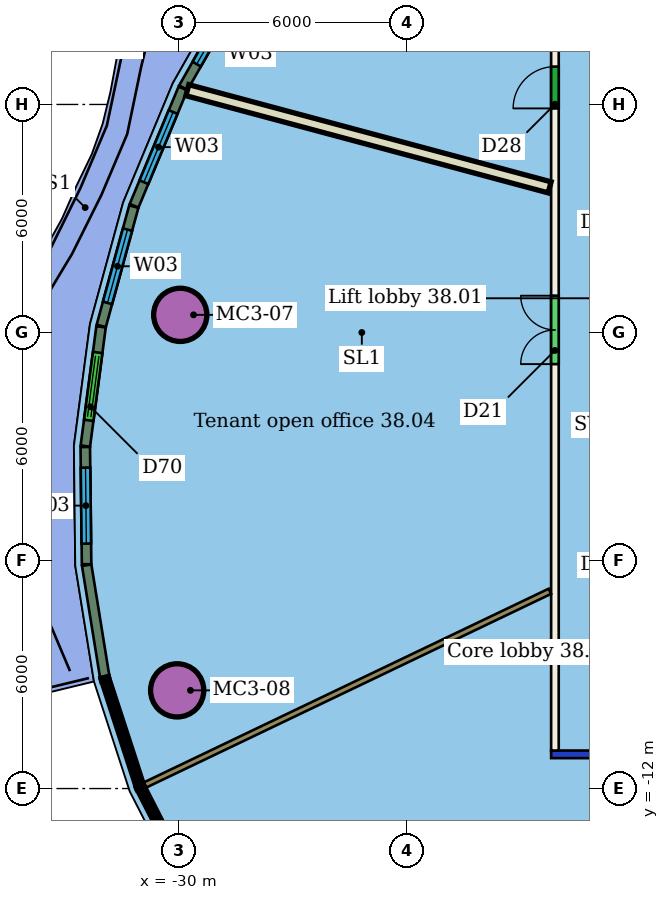
"""IFC4 building model, lengths in metres.
Left out: names, types, materials, properties, quantities, classifications, styles, units other than length and angle.
Written with IfcOpenShell. Run it as: python <this file> out.ifc"""

import sys

from ifc_helpers import new_model, si_unit, direction, frame, frame_2d, origin, origin_2d, place, context, subcontext, project, spatial, rectangle, hollow_circle, extrude, element, fill, save


model = new_model("IFC4")
c1 = context("Model", 3, precision=1e-05, world=origin(), true_north=direction((0.0, 1.0)))
c2 = subcontext(c1, "Body", "Model", "MODEL_VIEW")
j1 = project(units=[si_unit("LENGTHUNIT", "METRE"), si_unit("PLANEANGLEUNIT", "RADIAN")], contexts=[c1])
p1 = place(None, origin())
s1 = spatial("IfcSite", under=j1, at=p1, CompositionType="ELEMENT")
p2 = place(p1, origin())
s2 = spatial("IfcBuilding", under=s1, at=p2, CompositionType="ELEMENT")
p3 = place(p2, frame((0.0, 0.0, 161.4)))
s3 = spatial("IfcBuildingStorey", under=s2, at=p3, CompositionType="ELEMENT", Elevation=161.4)
for number, where, z_axis, x_axis in (
    (1, (-29.959, 0.464, 0.0), (0.0, 0.0, 1.0), (1.0, 0.0, 0.0)),
    (2, (-30.041, -9.417, 0.0), (0.0, 0.0, 1.0), (1.0, 0.0, 0.0)),
):
    element("IfcColumn", number, at=place(p3, frame(where, z_axis=z_axis, x_axis=x_axis)), inside=s3, PredefinedType="COLUMN", context=c2, shape_type="SweptSolid", body=[
        extrude(hollow_circle(Radius=0.7, WallThickness=0.05, at=origin_2d()), origin(), (0.0, 0.0, 1.0), 3.45),
    ])
p4 = place(p3, frame((8.2, -11.1, 0.0), z_axis=(0.0, 0.0, 1.0), x_axis=(-1.0, 0.0, 0.0)))
e3 = element("IfcWall", 3, at=p4, inside=s3, PredefinedType="PARTITIONING", context=c2, shape_type="SweptSolid", body=[
    extrude(rectangle(XDim=28.4, YDim=0.2, at=frame_2d((14.2, 0.0))), origin(), (0.0, 0.0, 1.0), 3.05),
])
p5 = place(p4, frame((24.868, 0.0, 0.0)))
e4 = element("IfcOpeningElement", 4, at=p5, cuts=e3, PredefinedType="OPENING", context=c2, shape_type="SweptSolid", body=[
    extrude(rectangle(XDim=1.0, YDim=2.1, at=frame_2d((0.5, 1.05))), frame((0.0, 0.11, 0.0), z_axis=(0.0, -1.0, 0.0), x_axis=(1.0, 0.0, 0.0)), (0.0, 0.0, 1.0), 0.22),
])
p6 = place(p4, frame((18.971, 0.0, 0.0)))
e5 = element("IfcOpeningElement", 5, at=p6, cuts=e3, PredefinedType="OPENING", context=c2, shape_type="SweptSolid", body=[
    extrude(rectangle(XDim=1.8, YDim=2.4, at=frame_2d((0.9, 1.2))), frame((0.0, 0.11, 0.0), z_axis=(0.0, -1.0, 0.0), x_axis=(1.0, 0.0, 0.0)), (0.0, 0.0, 1.0), 0.22),
])
p7 = place(p4, frame((8.524, 0.0, 0.0)))
e6 = element("IfcOpeningElement", 6, at=p7, cuts=e3, PredefinedType="OPENING", context=c2, shape_type="SweptSolid", body=[
    extrude(rectangle(XDim=1.2, YDim=2.1, at=frame_2d((0.6, 1.05))), frame((0.0, 0.11, 0.0), z_axis=(0.0, -1.0, 0.0), x_axis=(1.0, 0.0, 0.0)), (0.0, 0.0, 1.0), 0.22),
])
p8 = place(p3, frame((-20.1, -11.0, 0.0), z_axis=(0.0, 0.0, 1.0), x_axis=(0.0, 1.0, 0.0)))
e7 = element("IfcWall", 7, at=p8, inside=s3, PredefinedType="PARTITIONING", context=c2, shape_type="SweptSolid", body=[
    extrude(rectangle(XDim=22.0, YDim=0.2, at=frame_2d((11.0, 0.0))), origin(), (0.0, 0.0, 1.0), 3.45),
])
p9 = place(p8, frame((16.896, 0.0, 0.0)))
e8 = element("IfcOpeningElement", 8, at=p9, cuts=e7, PredefinedType="OPENING", context=c2, shape_type="SweptSolid", body=[
    extrude(rectangle(XDim=1.1, YDim=2.1, at=frame_2d((0.55, 1.05))), frame((0.0, 0.11, 0.0), z_axis=(0.0, -1.0, 0.0), x_axis=(1.0, 0.0, 0.0)), (0.0, 0.0, 1.0), 0.22),
])
p10 = place(p8, frame((10.168, 0.0, 0.0)))
e9 = element("IfcOpeningElement", 9, at=p10, cuts=e7, PredefinedType="OPENING", context=c2, shape_type="SweptSolid", body=[
    extrude(rectangle(XDim=1.8, YDim=2.1, at=frame_2d((0.9, 1.05))), frame((0.0, 0.11, 0.0), z_axis=(0.0, -1.0, 0.0), x_axis=(1.0, 0.0, 0.0)), (0.0, 0.0, 1.0), 0.22),
])
p11 = place(p3, frame((-29.772, 6.375, 0.0), z_axis=(0.0, 0.0, 1.0), x_axis=(0.965867747251, -0.259035701826, 0.0)))
e10 = element("IfcWall", 10, at=p11, inside=s3, PredefinedType="PARTITIONING", context=c2, shape_type="SweptSolid", body=[
    extrude(rectangle(XDim=9.87, YDim=0.3, at=frame_2d((4.935, 0.0))), origin(), (0.0, 0.0, 1.0), 3.45),
])
p12 = place(p3, frame((-30.896, -11.911, 0.0), z_axis=(0.0, 0.0, 1.0), x_axis=(0.90207340088, 0.431582644954, 0.0)))
e11 = element("IfcWall", 11, at=p12, inside=s3, PredefinedType="PARTITIONING", context=c2, shape_type="SweptSolid", body=[
    extrude(rectangle(XDim=11.822, YDim=0.15, at=frame_2d((5.911, 0.0))), origin(), (0.0, 0.0, 1.0), 3.45),
])
p13 = place(p3, frame((-23.244, -20.772, 0.0), z_axis=(0.0, 0.0, 1.0), x_axis=(0.638736555689, 0.769425508042, 0.0)))
e12 = element("IfcWall", 12, at=p13, inside=s3, PredefinedType="PARTITIONING", context=c2, shape_type="SweptSolid", body=[
    extrude(rectangle(XDim=12.316, YDim=0.3, at=frame_2d((6.158, 0.0))), origin(), (0.0, 0.0, 1.0), 3.45),
])
p14 = place(p3, frame((-28.185, 9.419, 0.0), z_axis=(0.0, 0.0, 1.0), x_axis=(-0.494211413801, -0.869341750101, 0.0)))
e13 = element("IfcWall", 13, at=p14, inside=s3, PredefinedType="SOLIDWALL", context=c2, shape_type="SweptSolid", body=[
    extrude(rectangle(XDim=3.426, YDim=0.25, at=frame_2d((1.713, 0.0))), origin(), (0.0, 0.0, 1.0), 3.1),
])
p15 = place(p14, frame((0.713, 0.0, 0.9)))
e14 = element("IfcOpeningElement", 14, at=p15, cuts=e13, PredefinedType="OPENING", context=c2, shape_type="SweptSolid", body=[
    extrude(rectangle(XDim=2.0, YDim=2.1, at=frame_2d((1.0, 1.05))), frame((0.0, 0.135, 0.0), z_axis=(0.0, -1.0, 0.0), x_axis=(1.0, 0.0, 0.0)), (0.0, 0.0, 1.0), 0.27),
])
p16 = place(p3, frame((-29.888, 6.42, 0.0), z_axis=(0.0, 0.0, 1.0), x_axis=(-0.38458945082, -0.923087728397, 0.0)))
e15 = element("IfcWall", 15, at=p16, inside=s3, PredefinedType="SOLIDWALL", context=c2, shape_type="SweptSolid", body=[
    extrude(rectangle(XDim=3.342, YDim=0.25, at=frame_2d((1.671, 0.0))), origin(), (0.0, 0.0, 1.0), 3.1),
])
p17 = place(p16, frame((0.671, 0.0, 0.9)))
e16 = element("IfcOpeningElement", 16, at=p17, cuts=e15, PredefinedType="OPENING", context=c2, shape_type="SweptSolid", body=[
    extrude(rectangle(XDim=2.0, YDim=2.1, at=frame_2d((1.0, 1.05))), frame((0.0, 0.135, 0.0), z_axis=(0.0, -1.0, 0.0), x_axis=(1.0, 0.0, 0.0)), (0.0, 0.0, 1.0), 0.27),
])
p18 = place(p3, frame((-31.182, 3.312, 0.0), z_axis=(0.0, 0.0, 1.0), x_axis=(-0.263263454996, -0.964723977759, 0.0)))
e17 = element("IfcWall", 17, at=p18, inside=s3, PredefinedType="SOLIDWALL", context=c2, shape_type="SweptSolid", body=[
    extrude(rectangle(XDim=3.253, YDim=0.25, at=frame_2d((1.626, 0.0))), origin(), (0.0, 0.0, 1.0), 3.1),
])
p19 = place(p18, frame((0.626, 0.0, 0.9)))
e18 = element("IfcOpeningElement", 18, at=p19, cuts=e17, PredefinedType="OPENING", context=c2, shape_type="SweptSolid", body=[
    extrude(rectangle(XDim=2.0, YDim=2.1, at=frame_2d((1.0, 1.05))), frame((0.0, 0.135, 0.0), z_axis=(0.0, -1.0, 0.0), x_axis=(1.0, 0.0, 0.0)), (0.0, 0.0, 1.0), 0.27),
])
p20 = place(p3, frame((-32.043, 0.149, 0.0), z_axis=(0.0, 0.0, 1.0), x_axis=(-0.13076382866, -0.991413546969, 0.0)))
e19 = element("IfcWall", 19, at=p20, inside=s3, PredefinedType="SOLIDWALL", context=c2, shape_type="SweptSolid", body=[
    extrude(rectangle(XDim=3.165, YDim=0.25, at=frame_2d((1.582, 0.0))), origin(), (0.0, 0.0, 1.0), 3.1),
])
p21 = place(p20, frame((0.682, 0.0, 0.0)))
e20 = element("IfcOpeningElement", 20, at=p21, cuts=e19, PredefinedType="OPENING", context=c2, shape_type="SweptSolid", body=[
    extrude(rectangle(XDim=1.8, YDim=2.4, at=frame_2d((0.9, 1.2))), frame((0.0, 0.135, 0.0), z_axis=(0.0, -1.0, 0.0), x_axis=(1.0, 0.0, 0.0)), (0.0, 0.0, 1.0), 0.27),
])
p22 = place(p3, frame((-32.458, -3.014, 0.0), z_axis=(0.0, 0.0, 1.0), x_axis=(0.011086671081, -0.999938540974, 0.0)))
e21 = element("IfcWall", 21, at=p22, inside=s3, PredefinedType="SOLIDWALL", context=c2, shape_type="SweptSolid", body=[
    extrude(rectangle(XDim=3.083, YDim=0.25, at=frame_2d((1.542, 0.0))), origin(), (0.0, 0.0, 1.0), 3.1),
])
p23 = place(p22, frame((0.542, 0.0, 0.9)))
e22 = element("IfcOpeningElement", 22, at=p23, cuts=e21, PredefinedType="OPENING", context=c2, shape_type="SweptSolid", body=[
    extrude(rectangle(XDim=2.0, YDim=2.1, at=frame_2d((1.0, 1.05))), frame((0.0, 0.135, 0.0), z_axis=(0.0, -1.0, 0.0), x_axis=(1.0, 0.0, 0.0)), (0.0, 0.0, 1.0), 0.27),
])
p24 = place(p3, frame((-32.422, -6.124, 0.0), z_axis=(0.0, 0.0, 1.0), x_axis=(0.159444104464, -0.987206957812, 0.0)))
e23 = element("IfcWall", 23, at=p24, inside=s3, PredefinedType="SOLIDWALL", context=c2, shape_type="SweptSolid", body=[
    extrude(rectangle(XDim=2.974, YDim=0.25, at=frame_2d((1.487, 0.0))), origin(), (0.0, 0.0, 1.0), 3.1),
])
p25 = place(p9, origin())
e24 = element("IfcDoor", 24, at=p25, inside=s3, OperationType="SINGLE_SWING_LEFT", PredefinedType="DOOR", context=c2, shape_type="SweptSolid", body=[
    extrude(rectangle(XDim=1.1, YDim=2.1, at=frame_2d((0.55, 1.05))), frame((0.0, 0.025, 0.0), z_axis=(0.0, -1.0, 0.0), x_axis=(1.0, 0.0, 0.0)), (0.0, 0.0, 1.0), 0.05),
])
fill(e8, e24)
p26 = place(p10, origin())
e25 = element("IfcDoor", 25, at=p26, inside=s3, OperationType="DOUBLE_DOOR_SINGLE_SWING", PredefinedType="DOOR", context=c2, shape_type="SweptSolid", body=[
    extrude(rectangle(XDim=1.8, YDim=2.1, at=frame_2d((0.9, 1.05))), frame((0.0, 0.025, 0.0), z_axis=(0.0, -1.0, 0.0), x_axis=(1.0, 0.0, 0.0)), (0.0, 0.0, 1.0), 0.05),
])
fill(e9, e25)
p27 = place(p15, origin())
e26 = element("IfcWindow", 26, at=p27, inside=s3, PartitioningType="SINGLE_PANEL", PredefinedType="WINDOW", context=c2, shape_type="SweptSolid", body=[
    extrude(rectangle(XDim=2.0, YDim=2.1, at=frame_2d((1.0, 1.05))), frame((0.0, 0.03, 0.0), z_axis=(0.0, -1.0, 0.0), x_axis=(1.0, 0.0, 0.0)), (0.0, 0.0, 1.0), 0.06),
])
fill(e14, e26)
p28 = place(p17, origin())
e27 = element("IfcWindow", 27, at=p28, inside=s3, PartitioningType="SINGLE_PANEL", PredefinedType="WINDOW", context=c2, shape_type="SweptSolid", body=[
    extrude(rectangle(XDim=2.0, YDim=2.1, at=frame_2d((1.0, 1.05))), frame((0.0, 0.03, 0.0), z_axis=(0.0, -1.0, 0.0), x_axis=(1.0, 0.0, 0.0)), (0.0, 0.0, 1.0), 0.06),
])
fill(e16, e27)
p29 = place(p19, origin())
e28 = element("IfcWindow", 28, at=p29, inside=s3, PartitioningType="SINGLE_PANEL", PredefinedType="WINDOW", context=c2, shape_type="SweptSolid", body=[
    extrude(rectangle(XDim=2.0, YDim=2.1, at=frame_2d((1.0, 1.05))), frame((0.0, 0.03, 0.0), z_axis=(0.0, -1.0, 0.0), x_axis=(1.0, 0.0, 0.0)), (0.0, 0.0, 1.0), 0.06),
])
fill(e18, e28)
p30 = place(p21, origin())
e29 = element("IfcDoor", 29, at=p30, inside=s3, OperationType="DOUBLE_DOOR_SLIDING", PredefinedType="DOOR", context=c2, shape_type="SweptSolid", body=[
    extrude(rectangle(XDim=1.8, YDim=2.4, at=frame_2d((0.9, 1.2))), frame((0.0, 0.025, 0.0), z_axis=(0.0, -1.0, 0.0), x_axis=(1.0, 0.0, 0.0)), (0.0, 0.0, 1.0), 0.05),
])
fill(e20, e29)
p31 = place(p23, origin())
e30 = element("IfcWindow", 30, at=p31, inside=s3, PartitioningType="SINGLE_PANEL", PredefinedType="WINDOW", context=c2, shape_type="SweptSolid", body=[
    extrude(rectangle(XDim=2.0, YDim=2.1, at=frame_2d((1.0, 1.05))), frame((0.0, 0.03, 0.0), z_axis=(0.0, -1.0, 0.0), x_axis=(1.0, 0.0, 0.0)), (0.0, 0.0, 1.0), 0.06),
])
fill(e22, e30)
save(model, sys.argv[1])
